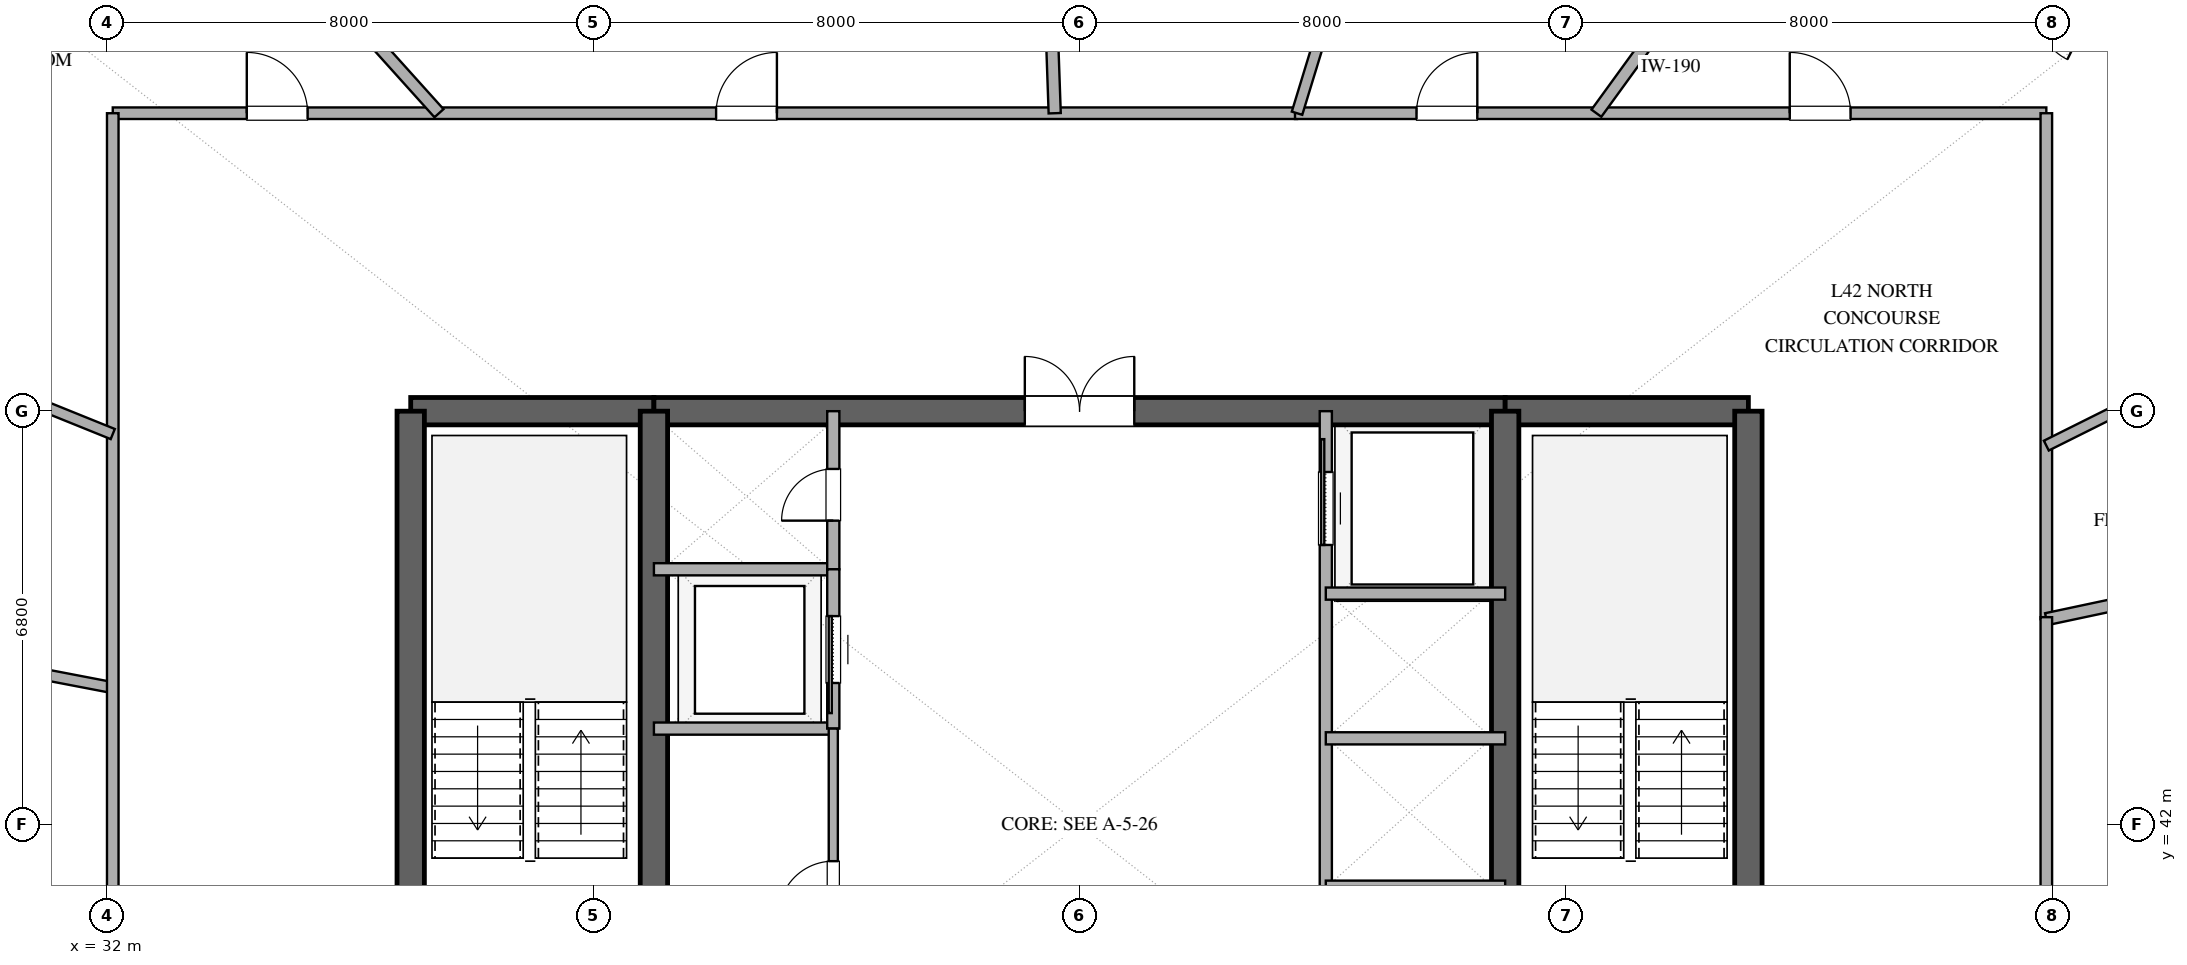
"""IFC4 building model, lengths in metres.
Left out: names, types, materials, properties, quantities, classifications, styles, units other than length and angle.
Written with IfcOpenShell. Run it as: python <this file> out.ifc"""

import sys

from ifc_helpers import new_model, si_unit, direction, frame, frame_2d, origin, place, context, subcontext, project, spatial, rectangle, extrude, element, fill, save


model = new_model("IFC4")
c1 = context("Model", 3, precision=1e-05, world=origin(), true_north=direction((0.0, 1.0)))
c2 = subcontext(c1, "Body", "Model", "MODEL_VIEW")
j1 = project(units=[si_unit("LENGTHUNIT", "METRE"), si_unit("PLANEANGLEUNIT", "RADIAN")], contexts=[c1])
p1 = place(None, origin())
s1 = spatial("IfcSite", under=j1, at=p1, CompositionType="ELEMENT")
p2 = place(p1, origin())
s2 = spatial("IfcBuilding", under=s1, at=p2, CompositionType="ELEMENT")
p3 = place(p2, frame((0.0, 0.0, 168.6)))
s3 = spatial("IfcBuildingStorey", under=s2, at=p3, CompositionType="ELEMENT", Elevation=168.6)
p4 = place(p3, frame((37.0, 48.8, 0.0), z_axis=(0.0, 0.0, 1.0), x_axis=(1.0, 0.0, 0.0)))
e1 = element("IfcWall", 1, at=p4, inside=s3, PredefinedType="SHEAR", context=c2, shape_type="SweptSolid", body=[
    extrude(rectangle(XDim=4.0, YDim=0.45, at=frame_2d((2.0, 0.0))), origin(), (0.0, 0.0, 1.0), 3.38),
])
p5 = place(p3, frame((41.0, 48.8, 0.0), z_axis=(0.0, 0.0, 1.0), x_axis=(1.0, 0.0, 0.0)))
e2 = element("IfcWall", 2, at=p5, inside=s3, PredefinedType="SHEAR", context=c2, shape_type="SweptSolid", body=[
    extrude(rectangle(XDim=14.0, YDim=0.45, at=frame_2d((7.0, 0.0))), origin(), (0.0, 0.0, 1.0), 3.38),
])
p6 = place(p5, frame((6.1, 0.0, 0.0)))
e3 = element("IfcOpeningElement", 3, at=p6, cuts=e2, PredefinedType="OPENING", context=c2, shape_type="SweptSolid", body=[
    extrude(rectangle(XDim=1.8, YDim=2.25, at=frame_2d((0.9, 1.125))), frame((0.0, 0.235, 0.0), z_axis=(0.0, -1.0, 0.0), x_axis=(1.0, 0.0, 0.0)), (0.0, 0.0, 1.0), 0.47),
])
p7 = place(p3, frame((55.0, 48.8, 0.0), z_axis=(0.0, 0.0, 1.0), x_axis=(1.0, 0.0, 0.0)))
e4 = element("IfcWall", 4, at=p7, inside=s3, PredefinedType="SHEAR", context=c2, shape_type="SweptSolid", body=[
    extrude(rectangle(XDim=4.0, YDim=0.45, at=frame_2d((2.0, 0.0))), origin(), (0.0, 0.0, 1.0), 3.38),
])
for number, where, z_axis, x_axis in (
    (5, (37.0, 35.2, 0.0), (0.0, 0.0, 1.0), (0.0, 1.0, 0.0)),
    (6, (59.0, 35.2, 0.0), (0.0, 0.0, 1.0), (0.0, 1.0, 0.0)),
):
    element("IfcWall", number, at=place(p3, frame(where, z_axis=z_axis, x_axis=x_axis)), inside=s3, PredefinedType="SHEAR", context=c2, shape_type="SweptSolid", body=[
        extrude(rectangle(XDim=13.6, YDim=0.45, at=frame_2d((6.8, 0.0))), origin(), (0.0, 0.0, 1.0), 3.38),
    ])
p8 = place(p3, frame((41.0, 35.2, 0.0), z_axis=(0.0, 0.0, 1.0), x_axis=(0.0, 1.0, 0.0)))
e7 = element("IfcWall", 7, at=p8, inside=s3, PredefinedType="SHEAR", context=c2, shape_type="SweptSolid", body=[
    extrude(rectangle(XDim=13.6, YDim=0.45, at=frame_2d((6.8, 0.0))), origin(), (0.0, 0.0, 1.0), 3.38),
])
p9 = place(p8, frame((1.15, 0.0, 0.0)))
e8 = element("IfcOpeningElement", 8, at=p9, cuts=e7, PredefinedType="OPENING", context=c2, shape_type="SweptSolid", body=[
    extrude(rectangle(XDim=1.1, YDim=2.2, at=frame_2d((0.55, 1.1))), frame((0.0, 0.235, 0.0), z_axis=(0.0, -1.0, 0.0), x_axis=(1.0, 0.0, 0.0)), (0.0, 0.0, 1.0), 0.47),
])
p10 = place(p3, frame((55.0, 35.2, 0.0), z_axis=(0.0, 0.0, 1.0), x_axis=(0.0, 1.0, 0.0)))
e9 = element("IfcWall", 9, at=p10, inside=s3, PredefinedType="SHEAR", context=c2, shape_type="SweptSolid", body=[
    extrude(rectangle(XDim=13.6, YDim=0.45, at=frame_2d((6.8, 0.0))), origin(), (0.0, 0.0, 1.0), 3.38),
])
p11 = place(p10, frame((1.15, 0.0, 0.0)))
e10 = element("IfcOpeningElement", 10, at=p11, cuts=e9, PredefinedType="OPENING", context=c2, shape_type="SweptSolid", body=[
    extrude(rectangle(XDim=1.1, YDim=2.2, at=frame_2d((0.55, 1.1))), frame((0.0, 0.235, 0.0), z_axis=(0.0, -1.0, 0.0), x_axis=(1.0, 0.0, 0.0)), (0.0, 0.0, 1.0), 0.47),
])
p12 = place(p3, frame((41.0, 46.2, 0.0), z_axis=(0.0, 0.0, 1.0), x_axis=(1.0, 0.0, 0.0)))
e11 = element("IfcWall", 11, at=p12, inside=s3, PredefinedType="SOLIDWALL", context=c2, shape_type="SweptSolid", body=[
    extrude(rectangle(XDim=2.95, YDim=0.2, at=frame_2d((1.475, 0.0))), origin(), (0.0, 0.0, 1.0), 2.74),
])
p13 = place(p3, frame((43.95, 46.2, 0.0), z_axis=(0.0, 0.0, 1.0), x_axis=(0.0, 1.0, 0.0)))
e12 = element("IfcWall", 12, at=p13, inside=s3, PredefinedType="SOLIDWALL", context=c2, shape_type="SweptSolid", body=[
    extrude(rectangle(XDim=2.6, YDim=0.2, at=frame_2d((1.3, 0.0))), origin(), (0.0, 0.0, 1.0), 2.74),
])
p14 = place(p13, frame((0.8, 0.0, 0.0)))
e13 = element("IfcOpeningElement", 13, at=p14, cuts=e12, PredefinedType="OPENING", context=c2, shape_type="SweptSolid", body=[
    extrude(rectangle(XDim=0.85, YDim=2.15, at=frame_2d((0.425, 1.075))), frame((0.0, 0.11, 0.0), z_axis=(0.0, -1.0, 0.0), x_axis=(1.0, 0.0, 0.0)), (0.0, 0.0, 1.0), 0.22),
])
p15 = place(p3, frame((41.0, 43.58, 0.0), z_axis=(0.0, 0.0, 1.0), x_axis=(1.0, 0.0, 0.0)))
e14 = element("IfcWall", 14, at=p15, inside=s3, PredefinedType="SOLIDWALL", context=c2, shape_type="SweptSolid", body=[
    extrude(rectangle(XDim=2.95, YDim=0.2, at=frame_2d((1.475, 0.0))), origin(), (0.0, 0.0, 1.0), 2.74),
])
p16 = place(p3, frame((43.95, 43.58, 0.0), z_axis=(0.0, 0.0, 1.0), x_axis=(0.0, 1.0, 0.0)))
e15 = element("IfcWall", 15, at=p16, inside=s3, PredefinedType="SOLIDWALL", context=c2, shape_type="SweptSolid", body=[
    extrude(rectangle(XDim=2.62, YDim=0.2, at=frame_2d((1.31, 0.0))), origin(), (0.0, 0.0, 1.0), 2.74),
])
p17 = place(p16, frame((0.75, 0.0, 0.0)))
e16 = element("IfcOpeningElement", 16, at=p17, cuts=e15, PredefinedType="OPENING", context=c2, shape_type="SweptSolid", body=[
    extrude(rectangle(XDim=1.1, YDim=2.2, at=frame_2d((0.55, 1.1))), frame((0.0, 0.11, 0.0), z_axis=(0.0, -1.0, 0.0), x_axis=(1.0, 0.0, 0.0)), (0.0, 0.0, 1.0), 0.22),
])
p18 = place(p3, frame((43.95, 38.4, 0.0), z_axis=(0.0, 0.0, 1.0), x_axis=(0.0, 1.0, 0.0)))
e17 = element("IfcWall", 17, at=p18, inside=s3, PredefinedType="PARTITIONING", context=c2, shape_type="SweptSolid", body=[
    extrude(rectangle(XDim=5.18, YDim=0.15, at=frame_2d((2.59, 0.0))), origin(), (0.0, 0.0, 1.0), 2.74),
])
p19 = place(p18, frame((2.1, 0.0, 0.0)))
e18 = element("IfcOpeningElement", 18, at=p19, cuts=e17, PredefinedType="OPENING", context=c2, shape_type="SweptSolid", body=[
    extrude(rectangle(XDim=0.9, YDim=2.15, at=frame_2d((0.45, 1.075))), frame((0.0, 0.085, 0.0), z_axis=(0.0, -1.0, 0.0), x_axis=(1.0, 0.0, 0.0)), (0.0, 0.0, 1.0), 0.17),
])
p20 = place(p3, frame((52.05, 38.4, 0.0), z_axis=(0.0, 0.0, 1.0), x_axis=(0.0, 1.0, 0.0)))
e19 = element("IfcWall", 19, at=p20, inside=s3, PredefinedType="SOLIDWALL", context=c2, shape_type="SweptSolid", body=[
    extrude(rectangle(XDim=10.4, YDim=0.2, at=frame_2d((5.2, 0.0))), origin(), (0.0, 0.0, 1.0), 2.74),
])
p21 = place(p20, frame((0.7, 0.0, 0.0)))
e20 = element("IfcOpeningElement", 20, at=p21, cuts=e19, PredefinedType="OPENING", context=c2, shape_type="SweptSolid", body=[
    extrude(rectangle(XDim=1.1, YDim=2.2, at=frame_2d((0.55, 1.1))), frame((0.0, 0.11, 0.0), z_axis=(0.0, -1.0, 0.0), x_axis=(1.0, 0.0, 0.0)), (0.0, 0.0, 1.0), 0.22),
])
p22 = place(p20, frame((8.2, 0.0, 0.0)))
e21 = element("IfcOpeningElement", 21, at=p22, cuts=e19, PredefinedType="OPENING", context=c2, shape_type="SweptSolid", body=[
    extrude(rectangle(XDim=1.2, YDim=2.2, at=frame_2d((0.6, 1.1))), frame((0.0, 0.11, 0.0), z_axis=(0.0, -1.0, 0.0), x_axis=(1.0, 0.0, 0.0)), (0.0, 0.0, 1.0), 0.22),
])
for number, where, z_axis, x_axis in (
    (22, (52.05, 40.98, 0.0), (0.0, 0.0, 1.0), (1.0, 0.0, 0.0)),
    (23, (52.05, 43.42, 0.0), (0.0, 0.0, 1.0), (1.0, 0.0, 0.0)),
    (24, (52.05, 45.8, 0.0), (0.0, 0.0, 1.0), (1.0, 0.0, 0.0)),
):
    element("IfcWall", number, at=place(p3, frame(where, z_axis=z_axis, x_axis=x_axis)), inside=s3, PredefinedType="SOLIDWALL", context=c2, shape_type="SweptSolid", body=[
        extrude(rectangle(XDim=2.95, YDim=0.2, at=frame_2d((1.475, 0.0))), origin(), (0.0, 0.0, 1.0), 2.74),
    ])
p23 = place(p3, frame((32.1, 53.7, 0.0), z_axis=(0.0, 0.0, 1.0), x_axis=(1.0, 0.0, 0.0)))
e25 = element("IfcWall", 25, at=p23, inside=s3, PredefinedType="PARTITIONING", context=c2, shape_type="SweptSolid", body=[
    extrude(rectangle(XDim=19.477, YDim=0.19, at=frame_2d((9.738, 0.0))), origin(), (0.0, 0.0, 1.0), 2.74),
])
p24 = place(p23, frame((9.923, 0.0, 0.0)))
e26 = element("IfcOpeningElement", 26, at=p24, cuts=e25, PredefinedType="OPENING", context=c2, shape_type="SweptSolid", body=[
    extrude(rectangle(XDim=1.0, YDim=2.2, at=frame_2d((0.5, 1.1))), frame((0.0, 0.105, 0.0), z_axis=(0.0, -1.0, 0.0), x_axis=(1.0, 0.0, 0.0)), (0.0, 0.0, 1.0), 0.21),
])
p25 = place(p23, frame((2.204, 0.0, 0.0)))
e27 = element("IfcOpeningElement", 27, at=p25, cuts=e25, PredefinedType="OPENING", context=c2, shape_type="SweptSolid", body=[
    extrude(rectangle(XDim=1.0, YDim=2.2, at=frame_2d((0.5, 1.1))), frame((0.0, 0.105, 0.0), z_axis=(0.0, -1.0, 0.0), x_axis=(1.0, 0.0, 0.0)), (0.0, 0.0, 1.0), 0.21),
])
p26 = place(p3, frame((51.543, 53.7, 0.0), z_axis=(0.0, 0.0, 1.0), x_axis=(1.0, 0.0, 0.0)))
e28 = element("IfcWall", 28, at=p26, inside=s3, PredefinedType="PARTITIONING", context=c2, shape_type="SweptSolid", body=[
    extrude(rectangle(XDim=12.356, YDim=0.19, at=frame_2d((6.178, 0.0))), origin(), (0.0, 0.0, 1.0), 2.74),
])
p27 = place(p26, frame((8.137, 0.0, 0.0)))
e29 = element("IfcOpeningElement", 29, at=p27, cuts=e28, PredefinedType="OPENING", context=c2, shape_type="SweptSolid", body=[
    extrude(rectangle(XDim=1.0, YDim=2.2, at=frame_2d((0.5, 1.1))), frame((0.0, 0.105, 0.0), z_axis=(0.0, -1.0, 0.0), x_axis=(1.0, 0.0, 0.0)), (0.0, 0.0, 1.0), 0.21),
])
p28 = place(p26, frame((1.998, 0.0, 0.0)))
e30 = element("IfcOpeningElement", 30, at=p28, cuts=e28, PredefinedType="OPENING", context=c2, shape_type="SweptSolid", body=[
    extrude(rectangle(XDim=1.0, YDim=2.2, at=frame_2d((0.5, 1.1))), frame((0.0, 0.105, 0.0), z_axis=(0.0, -1.0, 0.0), x_axis=(1.0, 0.0, 0.0)), (0.0, 0.0, 1.0), 0.21),
])
p29 = place(p3, frame((37.465, 53.7, 0.0), z_axis=(0.0, 0.0, 1.0), x_axis=(-0.669128292476, 0.7431469089, 0.0)))
e31 = element("IfcWall", 31, at=p29, inside=s3, PredefinedType="PARTITIONING", context=c2, shape_type="SweptSolid", body=[
    extrude(rectangle(XDim=7.339, YDim=0.2, at=frame_2d((3.669, 0.0))), origin(), (0.0, 0.0, 1.0), 2.74),
])
p30 = place(p3, frame((63.9, 53.7, 0.0), z_axis=(0.0, 0.0, 1.0), x_axis=(0.0, -1.0, 0.0)))
e32 = element("IfcWall", 32, at=p30, inside=s3, PredefinedType="PARTITIONING", context=c2, shape_type="SweptSolid", body=[
    extrude(rectangle(XDim=8.32, YDim=0.19, at=frame_2d((4.16, 0.0))), origin(), (0.0, 0.0, 1.0), 2.74),
])
p31 = place(p3, frame((32.1, 44.253, 0.0), z_axis=(0.0, 0.0, 1.0), x_axis=(-0.982102846986, 0.188345421878, 0.0)))
e33 = element("IfcWall", 33, at=p31, inside=s3, PredefinedType="PLUMBINGWALL", context=c2, shape_type="SweptSolid", body=[
    extrude(rectangle(XDim=5.448, YDim=0.18, at=frame_2d((2.724, 0.0))), origin(), (0.0, 0.0, 1.0), 2.74),
])
p32 = place(p31, frame((2.299, 0.0, 0.0)))
e34 = element("IfcOpeningElement", 34, at=p32, cuts=e33, PredefinedType="OPENING", context=c2, shape_type="SweptSolid", body=[
    extrude(rectangle(XDim=0.85, YDim=2.1, at=frame_2d((0.425, 1.05))), frame((0.0, 0.1, 0.0), z_axis=(0.0, -1.0, 0.0), x_axis=(1.0, 0.0, 0.0)), (0.0, 0.0, 1.0), 0.2),
])
p33 = place(p3, frame((32.1, 40.856, 0.0), z_axis=(0.0, 0.0, 1.0), x_axis=(0.0, 1.0, 0.0)))
e35 = element("IfcWall", 35, at=p33, inside=s3, PredefinedType="PARTITIONING", context=c2, shape_type="SweptSolid", body=[
    extrude(rectangle(XDim=12.844, YDim=0.19, at=frame_2d((6.422, 0.0))), origin(), (0.0, 0.0, 1.0), 2.74),
])
p34 = place(p3, frame((63.9, 45.38, 0.0), z_axis=(0.0, 0.0, 1.0), x_axis=(0.978145779981, 0.207920256603, 0.0)))
e36 = element("IfcWall", 36, at=p34, inside=s3, PredefinedType="PARTITIONING", context=c2, shape_type="SweptSolid", body=[
    extrude(rectangle(XDim=6.789, YDim=0.2, at=frame_2d((3.395, 0.0))), origin(), (0.0, 0.0, 1.0), 2.74),
])
p35 = place(p3, frame((63.9, 45.412, 0.0), z_axis=(0.0, 0.0, 1.0), x_axis=(0.0, -1.0, 0.0)))
e37 = element("IfcWall", 37, at=p35, inside=s3, PredefinedType="PARTITIONING", context=c2, shape_type="SweptSolid", body=[
    extrude(rectangle(XDim=4.987, YDim=0.19, at=frame_2d((2.494, 0.0))), origin(), (0.0, 0.0, 1.0), 2.74),
])
p36 = place(p3, frame((61.274, 60.27, 0.0), z_axis=(0.0, 0.0, 1.0), x_axis=(-0.587785528328, -0.809016793823, 0.0)))
e38 = element("IfcWall", 38, at=p36, inside=s3, PredefinedType="PARTITIONING", context=c2, shape_type="SweptSolid", body=[
    extrude(rectangle(XDim=8.121, YDim=0.2, at=frame_2d((4.061, 0.0))), origin(), (0.0, 0.0, 1.0), 2.74),
])
p37 = place(p3, frame((47.378, 59.821, 0.0), z_axis=(0.0, 0.0, 1.0), x_axis=(0.034876866147, -0.999391617039, 0.0)))
e39 = element("IfcWall", 39, at=p37, inside=s3, PredefinedType="PARTITIONING", context=c2, shape_type="SweptSolid", body=[
    extrude(rectangle(XDim=6.125, YDim=0.2, at=frame_2d((3.062, 0.0))), origin(), (0.0, 0.0, 1.0), 2.74),
])
p38 = place(p3, frame((52.797, 57.69, 0.0), z_axis=(0.0, 0.0, 1.0), x_axis=(-0.29241622154, -0.956291144673, 0.0)))
e40 = element("IfcWall", 40, at=p38, inside=s3, PredefinedType="PLUMBINGWALL", context=c2, shape_type="SweptSolid", body=[
    extrude(rectangle(XDim=4.173, YDim=0.18, at=frame_2d((2.086, 0.0))), origin(), (0.0, 0.0, 1.0), 2.74),
])
p39 = place(p3, frame((67.152, 49.856, 0.0), z_axis=(0.0, 0.0, 1.0), x_axis=(-0.894843352961, -0.446380301605, 0.0)))
e41 = element("IfcWall", 41, at=p39, inside=s3, PredefinedType="PLUMBINGWALL", context=c2, shape_type="SweptSolid", body=[
    extrude(rectangle(XDim=3.634, YDim=0.18, at=frame_2d((1.817, 0.0))), origin(), (0.0, 0.0, 1.0), 2.74),
])
p40 = place(p39, frame((1.392, 0.0, 0.0)))
e42 = element("IfcOpeningElement", 42, at=p40, cuts=e41, PredefinedType="OPENING", context=c2, shape_type="SweptSolid", body=[
    extrude(rectangle(XDim=0.85, YDim=2.1, at=frame_2d((0.425, 1.05))), frame((0.0, 0.1, 0.0), z_axis=(0.0, -1.0, 0.0), x_axis=(1.0, 0.0, 0.0)), (0.0, 0.0, 1.0), 0.2),
])
p41 = place(p3, frame((28.773, 49.768, 0.0), z_axis=(0.0, 0.0, 1.0), x_axis=(0.927195040954, -0.374578904945, 0.0)))
e43 = element("IfcWall", 43, at=p41, inside=s3, PredefinedType="PLUMBINGWALL", context=c2, shape_type="SweptSolid", body=[
    extrude(rectangle(XDim=3.589, YDim=0.18, at=frame_2d((1.794, 0.0))), origin(), (0.0, 0.0, 1.0), 2.74),
])
p42 = place(p6, origin())
e44 = element("IfcDoor", 44, at=p42, inside=s3, OperationType="DOUBLE_DOOR_SINGLE_SWING", PredefinedType="DOOR", context=c2, shape_type="SweptSolid", body=[
    extrude(rectangle(XDim=1.8, YDim=2.25, at=frame_2d((0.9, 1.125))), frame((0.0, 0.025, 0.0), z_axis=(0.0, -1.0, 0.0), x_axis=(1.0, 0.0, 0.0)), (0.0, 0.0, 1.0), 0.05),
])
fill(e3, e44)
p43 = place(p14, origin())
e45 = element("IfcDoor", 45, at=p43, inside=s3, OperationType="SINGLE_SWING_LEFT", PredefinedType="DOOR", context=c2, shape_type="SweptSolid", body=[
    extrude(rectangle(XDim=0.85, YDim=2.15, at=frame_2d((0.425, 1.075))), frame((0.0, 0.025, 0.0), z_axis=(0.0, -1.0, 0.0), x_axis=(1.0, 0.0, 0.0)), (0.0, 0.0, 1.0), 0.05),
])
fill(e13, e45)
p44 = place(p17, origin())
e46 = element("IfcDoor", 46, at=p44, inside=s3, OperationType="SLIDING_TO_LEFT", PredefinedType="DOOR", context=c2, shape_type="SweptSolid", body=[
    extrude(rectangle(XDim=1.1, YDim=2.2, at=frame_2d((0.55, 1.1))), frame((0.0, 0.025, 0.0), z_axis=(0.0, -1.0, 0.0), x_axis=(1.0, 0.0, 0.0)), (0.0, 0.0, 1.0), 0.05),
])
fill(e16, e46)
p45 = place(p19, origin())
e47 = element("IfcDoor", 47, at=p45, inside=s3, OperationType="SINGLE_SWING_LEFT", PredefinedType="DOOR", context=c2, shape_type="SweptSolid", body=[
    extrude(rectangle(XDim=0.9, YDim=2.15, at=frame_2d((0.45, 1.075))), frame((0.0, 0.025, 0.0), z_axis=(0.0, -1.0, 0.0), x_axis=(1.0, 0.0, 0.0)), (0.0, 0.0, 1.0), 0.05),
])
fill(e18, e47)
p46 = place(p22, origin())
e48 = element("IfcDoor", 48, at=p46, inside=s3, OperationType="SLIDING_TO_RIGHT", PredefinedType="DOOR", context=c2, shape_type="SweptSolid", body=[
    extrude(rectangle(XDim=1.2, YDim=2.2, at=frame_2d((0.6, 1.1))), frame((0.0, 0.025, 0.0), z_axis=(0.0, -1.0, 0.0), x_axis=(1.0, 0.0, 0.0)), (0.0, 0.0, 1.0), 0.05),
])
fill(e21, e48)
p47 = place(p24, origin())
e49 = element("IfcDoor", 49, at=p47, inside=s3, OperationType="SINGLE_SWING_RIGHT", PredefinedType="DOOR", context=c2, shape_type="SweptSolid", body=[
    extrude(rectangle(XDim=1.0, YDim=2.2, at=frame_2d((0.5, 1.1))), frame((0.0, 0.025, 0.0), z_axis=(0.0, -1.0, 0.0), x_axis=(1.0, 0.0, 0.0)), (0.0, 0.0, 1.0), 0.05),
])
fill(e26, e49)
p48 = place(p25, origin())
e50 = element("IfcDoor", 50, at=p48, inside=s3, OperationType="SINGLE_SWING_LEFT", PredefinedType="DOOR", context=c2, shape_type="SweptSolid", body=[
    extrude(rectangle(XDim=1.0, YDim=2.2, at=frame_2d((0.5, 1.1))), frame((0.0, 0.025, 0.0), z_axis=(0.0, -1.0, 0.0), x_axis=(1.0, 0.0, 0.0)), (0.0, 0.0, 1.0), 0.05),
])
fill(e27, e50)
p49 = place(p27, origin())
e51 = element("IfcDoor", 51, at=p49, inside=s3, OperationType="SINGLE_SWING_LEFT", PredefinedType="DOOR", context=c2, shape_type="SweptSolid", body=[
    extrude(rectangle(XDim=1.0, YDim=2.2, at=frame_2d((0.5, 1.1))), frame((0.0, 0.025, 0.0), z_axis=(0.0, -1.0, 0.0), x_axis=(1.0, 0.0, 0.0)), (0.0, 0.0, 1.0), 0.05),
])
fill(e29, e51)
p50 = place(p28, origin())
e52 = element("IfcDoor", 52, at=p50, inside=s3, OperationType="SINGLE_SWING_RIGHT", PredefinedType="DOOR", context=c2, shape_type="SweptSolid", body=[
    extrude(rectangle(XDim=1.0, YDim=2.2, at=frame_2d((0.5, 1.1))), frame((0.0, 0.025, 0.0), z_axis=(0.0, -1.0, 0.0), x_axis=(1.0, 0.0, 0.0)), (0.0, 0.0, 1.0), 0.05),
])
fill(e30, e52)
save(model, sys.argv[1])
